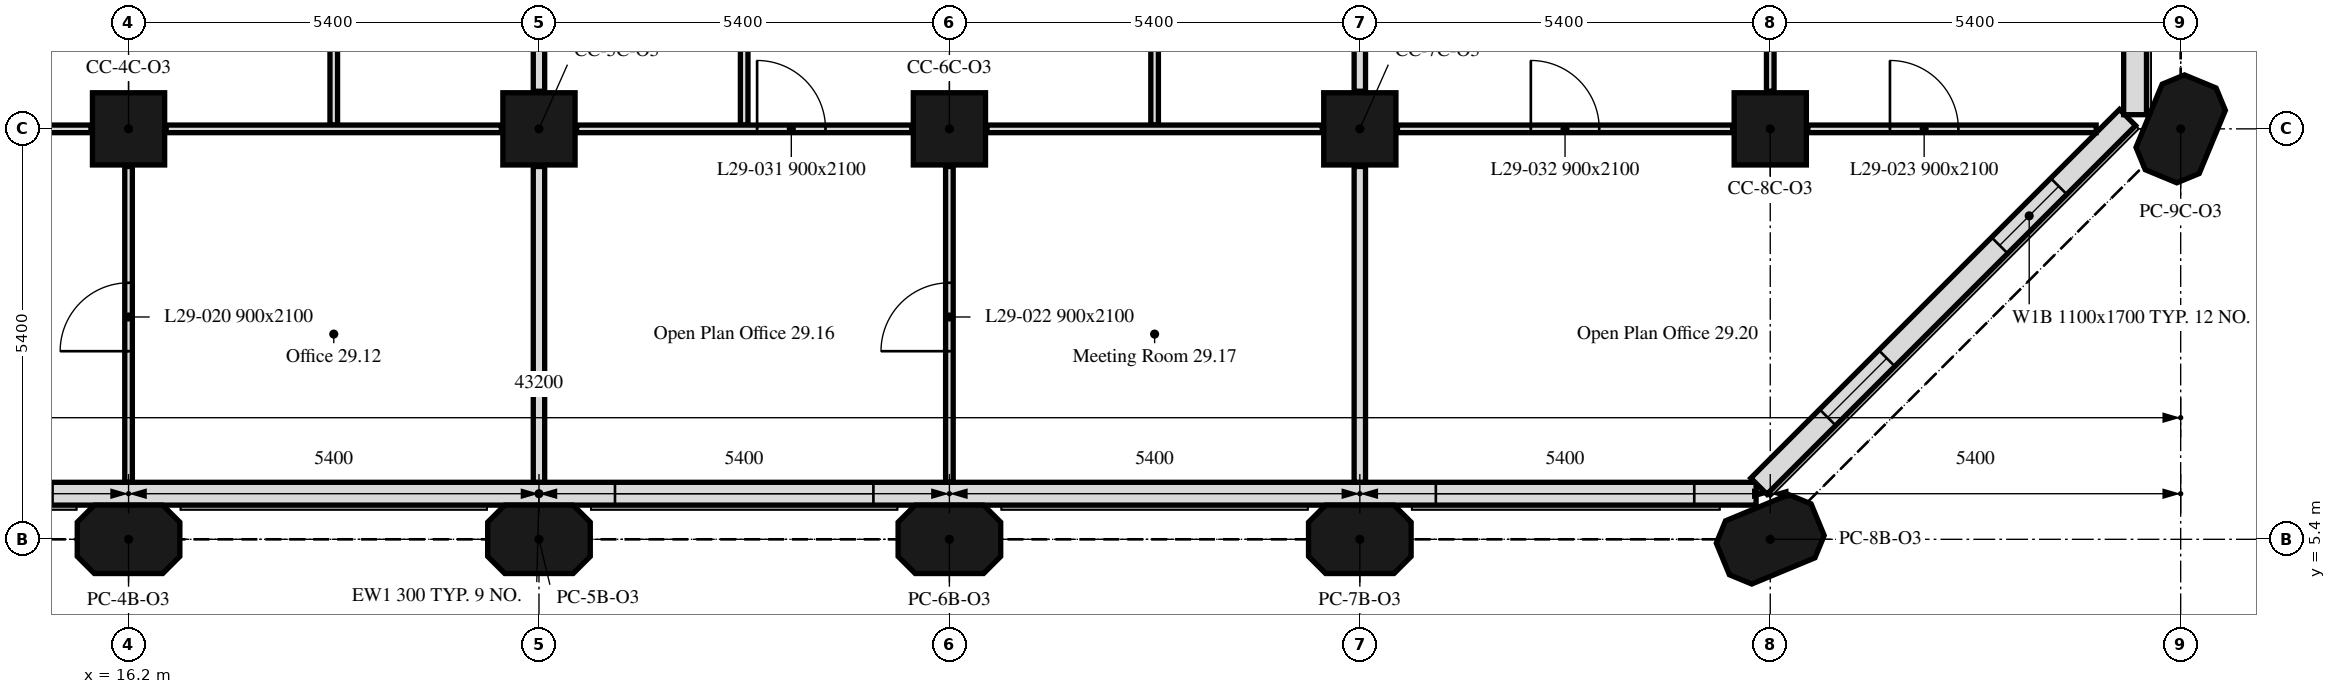
"""IFC4 building model, lengths in metres.
Left out: names, types, materials, properties, quantities, classifications, styles, units other than length and angle.
Written with IfcOpenShell. Run it as: python <this file> out.ifc"""

import sys

from ifc_helpers import new_model, si_unit, direction, frame, frame_2d, origin, origin_2d, place, context, subcontext, project, spatial, polyline, rectangle, outline, extrude, element, fill, save


model = new_model("IFC4")
c1 = context("Model", 3, precision=1e-05, world=origin(), true_north=direction((0.0, 1.0)))
c2 = subcontext(c1, "Body", "Model", "MODEL_VIEW")
j1 = project(units=[si_unit("LENGTHUNIT", "METRE"), si_unit("PLANEANGLEUNIT", "RADIAN")], contexts=[c1])
p1 = place(None, origin())
s1 = spatial("IfcSite", under=j1, at=p1, CompositionType="ELEMENT")
p2 = place(p1, origin())
s2 = spatial("IfcBuilding", under=s1, at=p2, CompositionType="ELEMENT")
p3 = place(p2, frame((0.0, 0.0, 122.0)))
s3 = spatial("IfcBuildingStorey", under=s2, at=p3, CompositionType="ELEMENT", Elevation=122.0)
for number, where, z_axis, x_axis in (
    (1, (16.2, 5.4, 0.0), (0.0, 0.0, 1.0), (1.0, 0.0, 0.0)),
    (2, (21.6, 5.4, 0.0), (0.0, 0.0, 1.0), (1.0, 0.0, 0.0)),
    (3, (27.0, 5.4, 0.0), (0.0, 0.0, 1.0), (1.0, 0.0, 0.0)),
    (4, (32.4, 5.4, 0.0), (0.0, 0.0, 1.0), (1.0, 0.0, 0.0)),
    (5, (37.8, 5.4, 0.0), (0.0, 0.0, 1.0), (0.924, 0.383, 0.0)),
):
    element("IfcColumn", number, at=place(p3, frame(where, z_axis=z_axis, x_axis=x_axis)), inside=s3, PredefinedType="COLUMN", context=c2, shape_type="SweptSolid", body=[
        extrude(outline(polyline([(-0.45, -0.45), (0.45, -0.45), (0.675, -0.225), (0.675, 0.225), (0.45, 0.45), (-0.45, 0.45), (-0.675, 0.225), (-0.675, -0.225), (-0.45, -0.45)])), origin(), (0.0, 0.0, 1.0), 3.3),
    ])
for number, where, z_axis, x_axis in (
    (6, (16.2, 10.8, 0.0), (0.0, 0.0, 1.0), (1.0, 0.0, 0.0)),
    (7, (21.6, 10.8, 0.0), (0.0, 0.0, 1.0), (1.0, 0.0, 0.0)),
    (8, (27.0, 10.8, 0.0), (0.0, 0.0, 1.0), (1.0, 0.0, 0.0)),
    (9, (32.4, 10.8, 0.0), (0.0, 0.0, 1.0), (1.0, 0.0, 0.0)),
    (10, (37.8, 10.8, 0.0), (0.0, 0.0, 1.0), (1.0, 0.0, 0.0)),
):
    element("IfcColumn", number, at=place(p3, frame(where, z_axis=z_axis, x_axis=x_axis)), inside=s3, PredefinedType="COLUMN", context=c2, shape_type="SweptSolid", body=[
        extrude(rectangle(XDim=0.95, YDim=0.95, at=origin_2d()), origin(), (0.0, 0.0, 1.0), 3.3),
    ])
p4 = place(p3, frame((43.2, 10.8, 0.0), z_axis=(0.0, 0.0, 1.0), x_axis=(0.382683432365, 0.923879532511, 0.0)))
e11 = element("IfcColumn", 11, at=p4, inside=s3, PredefinedType="COLUMN", context=c2, shape_type="SweptSolid", body=[
    extrude(outline(polyline([(-0.45, -0.45), (0.45, -0.45), (0.675, -0.225), (0.675, 0.225), (0.45, 0.45), (-0.45, 0.45), (-0.675, 0.225), (-0.675, -0.225), (-0.45, -0.45)])), origin(), (0.0, 0.0, 1.0), 3.3),
])
p5 = place(p3, frame((5.586, 6.0, 0.0), z_axis=(0.0, 0.0, 1.0), x_axis=(1.0, 0.0, 0.0)))
e12 = element("IfcWall", 12, at=p5, inside=s3, PredefinedType="SOLIDWALL", context=c2, shape_type="SweptSolid", body=[
    extrude(rectangle(XDim=32.027, YDim=0.3, at=frame_2d((16.014, 0.0))), origin(), (0.0, 0.0, 1.0), 3.3),
])
p6 = place(p5, frame((6.214, 0.0, 0.9)))
e13 = element("IfcOpeningElement", 13, at=p6, cuts=e12, PredefinedType="OPENING", context=c2, shape_type="SweptSolid", body=[
    extrude(rectangle(XDim=3.4, YDim=1.7, at=frame_2d((1.7, 0.85))), frame((0.0, 0.16, 0.0), z_axis=(0.0, -1.0, 0.0), x_axis=(1.0, 0.0, 0.0)), (0.0, 0.0, 1.0), 0.32),
])
p7 = place(p5, frame((17.014, 0.0, 0.9)))
e14 = element("IfcOpeningElement", 14, at=p7, cuts=e12, PredefinedType="OPENING", context=c2, shape_type="SweptSolid", body=[
    extrude(rectangle(XDim=3.4, YDim=1.7, at=frame_2d((1.7, 0.85))), frame((0.0, 0.16, 0.0), z_axis=(0.0, -1.0, 0.0), x_axis=(1.0, 0.0, 0.0)), (0.0, 0.0, 1.0), 0.32),
])
p8 = place(p5, frame((27.814, 0.0, 0.9)))
e15 = element("IfcOpeningElement", 15, at=p8, cuts=e12, PredefinedType="OPENING", context=c2, shape_type="SweptSolid", body=[
    extrude(rectangle(XDim=3.4, YDim=1.7, at=frame_2d((1.7, 0.85))), frame((0.0, 0.16, 0.0), z_axis=(0.0, -1.0, 0.0), x_axis=(1.0, 0.0, 0.0)), (0.0, 0.0, 1.0), 0.32),
])
p9 = place(p3, frame((37.65, 6.099, 0.0), z_axis=(0.0, 0.0, 1.0), x_axis=(0.707106781187, 0.707106781187, 0.0)))
e16 = element("IfcWall", 16, at=p9, inside=s3, PredefinedType="SOLIDWALL", context=c2, shape_type="SweptSolid", body=[
    extrude(rectangle(XDim=6.86, YDim=0.3, at=frame_2d((3.43, 0.0))), origin(), (0.0, 0.0, 1.0), 3.3),
])
p10 = place(p9, frame((1.28, 0.0, 0.9)))
e17 = element("IfcOpeningElement", 17, at=p10, cuts=e16, PredefinedType="OPENING", context=c2, shape_type="SweptSolid", body=[
    extrude(rectangle(XDim=1.1, YDim=1.7, at=frame_2d((0.55, 0.85))), frame((0.0, 0.16, 0.0), z_axis=(0.0, -1.0, 0.0), x_axis=(1.0, 0.0, 0.0)), (0.0, 0.0, 1.0), 0.32),
])
p11 = place(p9, frame((4.48, 0.0, 0.9)))
e18 = element("IfcOpeningElement", 18, at=p11, cuts=e16, PredefinedType="OPENING", context=c2, shape_type="SweptSolid", body=[
    extrude(rectangle(XDim=1.1, YDim=1.7, at=frame_2d((0.55, 0.85))), frame((0.0, 0.16, 0.0), z_axis=(0.0, -1.0, 0.0), x_axis=(1.0, 0.0, 0.0)), (0.0, 0.0, 1.0), 0.32),
])
p12 = place(p3, frame((42.6, 10.986, 0.0), z_axis=(0.0, 0.0, 1.0), x_axis=(0.0, 1.0, 0.0)))
e19 = element("IfcWall", 19, at=p12, inside=s3, PredefinedType="SOLIDWALL", context=c2, shape_type="SweptSolid", body=[
    extrude(rectangle(XDim=5.214, YDim=0.3, at=frame_2d((2.607, 0.0))), origin(), (0.0, 0.0, 1.0), 3.3),
])
p13 = place(p3, frame((11.295, 10.8, 0.0), z_axis=(0.0, 0.0, 1.0), x_axis=(1.0, 0.0, 0.0)))
e20 = element("IfcWall", 20, at=p13, inside=s3, PredefinedType="PARTITIONING", context=c2, shape_type="SweptSolid", body=[
    extrude(rectangle(XDim=4.41, YDim=0.1, at=frame_2d((2.205, 0.0))), origin(), (0.0, 0.0, 1.0), 2.55),
])
p14 = place(p13, frame((2.375, 0.0, 0.0)))
e21 = element("IfcOpeningElement", 21, at=p14, cuts=e20, PredefinedType="OPENING", context=c2, shape_type="SweptSolid", body=[
    extrude(rectangle(XDim=0.9, YDim=2.1, at=frame_2d((0.45, 1.05))), frame((0.0, 0.05, 0.0), z_axis=(0.0, -1.0, 0.0), x_axis=(1.0, 0.0, 0.0)), (0.0, 0.0, 1.0), 0.1),
])
p15 = place(p3, frame((18.9, 10.85, 0.0), z_axis=(0.0, 0.0, 1.0), x_axis=(0.0, 1.0, 0.0)))
e22 = element("IfcWall", 22, at=p15, inside=s3, PredefinedType="PARTITIONING", context=c2, shape_type="SweptSolid", body=[
    extrude(rectangle(XDim=2.575, YDim=0.1, at=frame_2d((1.288, 0.0))), origin(), (0.0, 0.0, 1.0), 3.3),
])
p16 = place(p15, frame((1.425, 0.0, 0.0)))
e23 = element("IfcOpeningElement", 23, at=p16, cuts=e22, PredefinedType="OPENING", context=c2, shape_type="SweptSolid", body=[
    extrude(rectangle(XDim=0.9, YDim=2.1, at=frame_2d((0.45, 1.05))), frame((0.0, 0.05, 0.0), z_axis=(0.0, -1.0, 0.0), x_axis=(1.0, 0.0, 0.0)), (0.0, 0.0, 1.0), 0.1),
])
p17 = place(p3, frame((16.695, 10.8, 0.0), z_axis=(0.0, 0.0, 1.0), x_axis=(1.0, 0.0, 0.0)))
e24 = element("IfcWall", 24, at=p17, inside=s3, PredefinedType="PARTITIONING", context=c2, shape_type="SweptSolid", body=[
    extrude(rectangle(XDim=4.41, YDim=0.1, at=frame_2d((2.205, 0.0))), origin(), (0.0, 0.0, 1.0), 3.3),
])
p18 = place(p3, frame((21.6, 11.295, 0.0), z_axis=(0.0, 0.0, 1.0), x_axis=(0.0, 1.0, 0.0)))
e25 = element("IfcWall", 25, at=p18, inside=s3, PredefinedType="PARTITIONING", context=c2, shape_type="SweptSolid", body=[
    extrude(rectangle(XDim=2.13, YDim=0.15, at=frame_2d((1.065, 0.0))), origin(), (0.0, 0.0, 1.0), 2.55),
])
p19 = place(p3, frame((16.2, 6.151, 0.0), z_axis=(0.0, 0.0, 1.0), x_axis=(0.0, 1.0, 0.0)))
e26 = element("IfcWall", 26, at=p19, inside=s3, PredefinedType="PARTITIONING", context=c2, shape_type="SweptSolid", body=[
    extrude(rectangle(XDim=4.154, YDim=0.1, at=frame_2d((2.077, 0.0))), origin(), (0.0, 0.0, 1.0), 2.55),
])
p20 = place(p19, frame((1.724, 0.0, 0.0)))
e27 = element("IfcOpeningElement", 27, at=p20, cuts=e26, PredefinedType="OPENING", context=c2, shape_type="SweptSolid", body=[
    extrude(rectangle(XDim=0.9, YDim=2.1, at=frame_2d((0.45, 1.05))), frame((0.0, 0.05, 0.0), z_axis=(0.0, -1.0, 0.0), x_axis=(1.0, 0.0, 0.0)), (0.0, 0.0, 1.0), 0.1),
])
p21 = place(p3, frame((21.6, 6.151, 0.0), z_axis=(0.0, 0.0, 1.0), x_axis=(0.0, 1.0, 0.0)))
e28 = element("IfcWall", 28, at=p21, inside=s3, PredefinedType="PARTITIONING", context=c2, shape_type="SweptSolid", body=[
    extrude(rectangle(XDim=4.154, YDim=0.15, at=frame_2d((2.077, 0.0))), origin(), (0.0, 0.0, 1.0), 2.55),
])
p22 = place(p3, frame((24.3, 10.85, 0.0), z_axis=(0.0, 0.0, 1.0), x_axis=(0.0, 1.0, 0.0)))
e29 = element("IfcWall", 29, at=p22, inside=s3, PredefinedType="PARTITIONING", context=c2, shape_type="SweptSolid", body=[
    extrude(rectangle(XDim=2.575, YDim=0.1, at=frame_2d((1.288, 0.0))), origin(), (0.0, 0.0, 1.0), 3.3),
])
p23 = place(p3, frame((22.095, 10.8, 0.0), z_axis=(0.0, 0.0, 1.0), x_axis=(1.0, 0.0, 0.0)))
e30 = element("IfcWall", 30, at=p23, inside=s3, PredefinedType="PARTITIONING", context=c2, shape_type="SweptSolid", body=[
    extrude(rectangle(XDim=4.41, YDim=0.1, at=frame_2d((2.205, 0.0))), origin(), (0.0, 0.0, 1.0), 3.3),
])
p24 = place(p23, frame((2.375, 0.0, 0.0)))
e31 = element("IfcOpeningElement", 31, at=p24, cuts=e30, PredefinedType="OPENING", context=c2, shape_type="SweptSolid", body=[
    extrude(rectangle(XDim=0.9, YDim=2.1, at=frame_2d((0.45, 1.05))), frame((0.0, 0.05, 0.0), z_axis=(0.0, -1.0, 0.0), x_axis=(1.0, 0.0, 0.0)), (0.0, 0.0, 1.0), 0.1),
])
p25 = place(p3, frame((29.7, 10.85, 0.0), z_axis=(0.0, 0.0, 1.0), x_axis=(0.0, 1.0, 0.0)))
e32 = element("IfcWall", 32, at=p25, inside=s3, PredefinedType="PARTITIONING", context=c2, shape_type="SweptSolid", body=[
    extrude(rectangle(XDim=2.575, YDim=0.1, at=frame_2d((1.288, 0.0))), origin(), (0.0, 0.0, 1.0), 3.3),
])
p26 = place(p25, frame((1.425, 0.0, 0.0)))
e33 = element("IfcOpeningElement", 33, at=p26, cuts=e32, PredefinedType="OPENING", context=c2, shape_type="SweptSolid", body=[
    extrude(rectangle(XDim=0.9, YDim=2.1, at=frame_2d((0.45, 1.05))), frame((0.0, 0.05, 0.0), z_axis=(0.0, -1.0, 0.0), x_axis=(1.0, 0.0, 0.0)), (0.0, 0.0, 1.0), 0.1),
])
p27 = place(p3, frame((27.495, 10.8, 0.0), z_axis=(0.0, 0.0, 1.0), x_axis=(1.0, 0.0, 0.0)))
e34 = element("IfcWall", 34, at=p27, inside=s3, PredefinedType="PARTITIONING", context=c2, shape_type="SweptSolid", body=[
    extrude(rectangle(XDim=4.41, YDim=0.1, at=frame_2d((2.205, 0.0))), origin(), (0.0, 0.0, 1.0), 3.3),
])
p28 = place(p3, frame((32.4, 11.295, 0.0), z_axis=(0.0, 0.0, 1.0), x_axis=(0.0, 1.0, 0.0)))
e35 = element("IfcWall", 35, at=p28, inside=s3, PredefinedType="PARTITIONING", context=c2, shape_type="SweptSolid", body=[
    extrude(rectangle(XDim=2.13, YDim=0.15, at=frame_2d((1.065, 0.0))), origin(), (0.0, 0.0, 1.0), 2.55),
])
p29 = place(p3, frame((27.0, 6.151, 0.0), z_axis=(0.0, 0.0, 1.0), x_axis=(0.0, 1.0, 0.0)))
e36 = element("IfcWall", 36, at=p29, inside=s3, PredefinedType="PARTITIONING", context=c2, shape_type="SweptSolid", body=[
    extrude(rectangle(XDim=4.154, YDim=0.1, at=frame_2d((2.077, 0.0))), origin(), (0.0, 0.0, 1.0), 2.55),
])
p30 = place(p29, frame((1.724, 0.0, 0.0)))
e37 = element("IfcOpeningElement", 37, at=p30, cuts=e36, PredefinedType="OPENING", context=c2, shape_type="SweptSolid", body=[
    extrude(rectangle(XDim=0.9, YDim=2.1, at=frame_2d((0.45, 1.05))), frame((0.0, 0.05, 0.0), z_axis=(0.0, -1.0, 0.0), x_axis=(1.0, 0.0, 0.0)), (0.0, 0.0, 1.0), 0.1),
])
p31 = place(p3, frame((32.4, 6.151, 0.0), z_axis=(0.0, 0.0, 1.0), x_axis=(0.0, 1.0, 0.0)))
e38 = element("IfcWall", 38, at=p31, inside=s3, PredefinedType="PARTITIONING", context=c2, shape_type="SweptSolid", body=[
    extrude(rectangle(XDim=4.154, YDim=0.15, at=frame_2d((2.077, 0.0))), origin(), (0.0, 0.0, 1.0), 2.55),
])
p32 = place(p3, frame((32.895, 10.8, 0.0), z_axis=(0.0, 0.0, 1.0), x_axis=(1.0, 0.0, 0.0)))
e39 = element("IfcWall", 39, at=p32, inside=s3, PredefinedType="PARTITIONING", context=c2, shape_type="SweptSolid", body=[
    extrude(rectangle(XDim=4.41, YDim=0.1, at=frame_2d((2.205, 0.0))), origin(), (0.0, 0.0, 1.0), 3.3),
])
p33 = place(p32, frame((1.755, 0.0, 0.0)))
e40 = element("IfcOpeningElement", 40, at=p33, cuts=e39, PredefinedType="OPENING", context=c2, shape_type="SweptSolid", body=[
    extrude(rectangle(XDim=0.9, YDim=2.1, at=frame_2d((0.45, 1.05))), frame((0.0, 0.05, 0.0), z_axis=(0.0, -1.0, 0.0), x_axis=(1.0, 0.0, 0.0)), (0.0, 0.0, 1.0), 0.1),
])
p34 = place(p3, frame((37.8, 11.295, 0.0), z_axis=(0.0, 0.0, 1.0), x_axis=(0.0, 1.0, 0.0)))
e41 = element("IfcWall", 41, at=p34, inside=s3, PredefinedType="PARTITIONING", context=c2, shape_type="SweptSolid", body=[
    extrude(rectangle(XDim=2.13, YDim=0.1, at=frame_2d((1.065, 0.0))), origin(), (0.0, 0.0, 1.0), 3.3),
])
p35 = place(p3, frame((38.295, 10.8, 0.0), z_axis=(0.0, 0.0, 1.0), x_axis=(1.0, 0.0, 0.0)))
e42 = element("IfcWall", 42, at=p35, inside=s3, PredefinedType="PARTITIONING", context=c2, shape_type="SweptSolid", body=[
    extrude(rectangle(XDim=3.793, YDim=0.1, at=frame_2d((1.896, 0.0))), origin(), (0.0, 0.0, 1.0), 3.3),
])
p36 = place(p35, frame((1.08, 0.0, 0.0)))
e43 = element("IfcOpeningElement", 43, at=p36, cuts=e42, PredefinedType="OPENING", context=c2, shape_type="SweptSolid", body=[
    extrude(rectangle(XDim=0.9, YDim=2.1, at=frame_2d((0.45, 1.05))), frame((0.0, 0.05, 0.0), z_axis=(0.0, -1.0, 0.0), x_axis=(1.0, 0.0, 0.0)), (0.0, 0.0, 1.0), 0.1),
])
p37 = place(p7, origin())
e44 = element("IfcWindow", 44, at=p37, inside=s3, PartitioningType="SINGLE_PANEL", PredefinedType="WINDOW", context=c2, shape_type="SweptSolid", body=[
    extrude(rectangle(XDim=3.4, YDim=1.7, at=frame_2d((1.7, 0.85))), frame((0.0, 0.03, 0.0), z_axis=(0.0, -1.0, 0.0), x_axis=(1.0, 0.0, 0.0)), (0.0, 0.0, 1.0), 0.06),
])
fill(e14, e44)
p38 = place(p8, origin())
e45 = element("IfcWindow", 45, at=p38, inside=s3, PartitioningType="SINGLE_PANEL", PredefinedType="WINDOW", context=c2, shape_type="SweptSolid", body=[
    extrude(rectangle(XDim=3.4, YDim=1.7, at=frame_2d((1.7, 0.85))), frame((0.0, 0.03, 0.0), z_axis=(0.0, -1.0, 0.0), x_axis=(1.0, 0.0, 0.0)), (0.0, 0.0, 1.0), 0.06),
])
fill(e15, e45)
p39 = place(p10, origin())
e46 = element("IfcWindow", 46, at=p39, inside=s3, PartitioningType="SINGLE_PANEL", PredefinedType="WINDOW", context=c2, shape_type="SweptSolid", body=[
    extrude(rectangle(XDim=1.1, YDim=1.7, at=frame_2d((0.55, 0.85))), frame((0.0, 0.03, 0.0), z_axis=(0.0, -1.0, 0.0), x_axis=(1.0, 0.0, 0.0)), (0.0, 0.0, 1.0), 0.06),
])
fill(e17, e46)
p40 = place(p11, origin())
e47 = element("IfcWindow", 47, at=p40, inside=s3, PartitioningType="SINGLE_PANEL", PredefinedType="WINDOW", context=c2, shape_type="SweptSolid", body=[
    extrude(rectangle(XDim=1.1, YDim=1.7, at=frame_2d((0.55, 0.85))), frame((0.0, 0.03, 0.0), z_axis=(0.0, -1.0, 0.0), x_axis=(1.0, 0.0, 0.0)), (0.0, 0.0, 1.0), 0.06),
])
fill(e18, e47)
p41 = place(p20, origin())
e48 = element("IfcDoor", 48, at=p41, inside=s3, OperationType="SINGLE_SWING_RIGHT", PredefinedType="DOOR", context=c2, shape_type="SweptSolid", body=[
    extrude(rectangle(XDim=0.9, YDim=2.1, at=frame_2d((0.45, 1.05))), frame((0.0, 0.025, 0.0), z_axis=(0.0, -1.0, 0.0), x_axis=(1.0, 0.0, 0.0)), (0.0, 0.0, 1.0), 0.05),
])
fill(e27, e48)
p42 = place(p30, origin())
e49 = element("IfcDoor", 49, at=p42, inside=s3, OperationType="SINGLE_SWING_RIGHT", PredefinedType="DOOR", context=c2, shape_type="SweptSolid", body=[
    extrude(rectangle(XDim=0.9, YDim=2.1, at=frame_2d((0.45, 1.05))), frame((0.0, 0.025, 0.0), z_axis=(0.0, -1.0, 0.0), x_axis=(1.0, 0.0, 0.0)), (0.0, 0.0, 1.0), 0.05),
])
fill(e37, e49)
p43 = place(p36, origin())
e50 = element("IfcDoor", 50, at=p43, inside=s3, OperationType="SINGLE_SWING_RIGHT", PredefinedType="DOOR", context=c2, shape_type="SweptSolid", body=[
    extrude(rectangle(XDim=0.9, YDim=2.1, at=frame_2d((0.45, 1.05))), frame((0.0, 0.025, 0.0), z_axis=(0.0, -1.0, 0.0), x_axis=(1.0, 0.0, 0.0)), (0.0, 0.0, 1.0), 0.05),
])
fill(e43, e50)
p44 = place(p24, origin())
e51 = element("IfcDoor", 51, at=p44, inside=s3, OperationType="SINGLE_SWING_LEFT", PredefinedType="DOOR", context=c2, shape_type="SweptSolid", body=[
    extrude(rectangle(XDim=0.9, YDim=2.1, at=frame_2d((0.45, 1.05))), frame((0.0, 0.025, 0.0), z_axis=(0.0, -1.0, 0.0), x_axis=(1.0, 0.0, 0.0)), (0.0, 0.0, 1.0), 0.05),
])
fill(e31, e51)
p45 = place(p33, origin())
e52 = element("IfcDoor", 52, at=p45, inside=s3, OperationType="SINGLE_SWING_LEFT", PredefinedType="DOOR", context=c2, shape_type="SweptSolid", body=[
    extrude(rectangle(XDim=0.9, YDim=2.1, at=frame_2d((0.45, 1.05))), frame((0.0, 0.025, 0.0), z_axis=(0.0, -1.0, 0.0), x_axis=(1.0, 0.0, 0.0)), (0.0, 0.0, 1.0), 0.05),
])
fill(e40, e52)
save(model, sys.argv[1])
